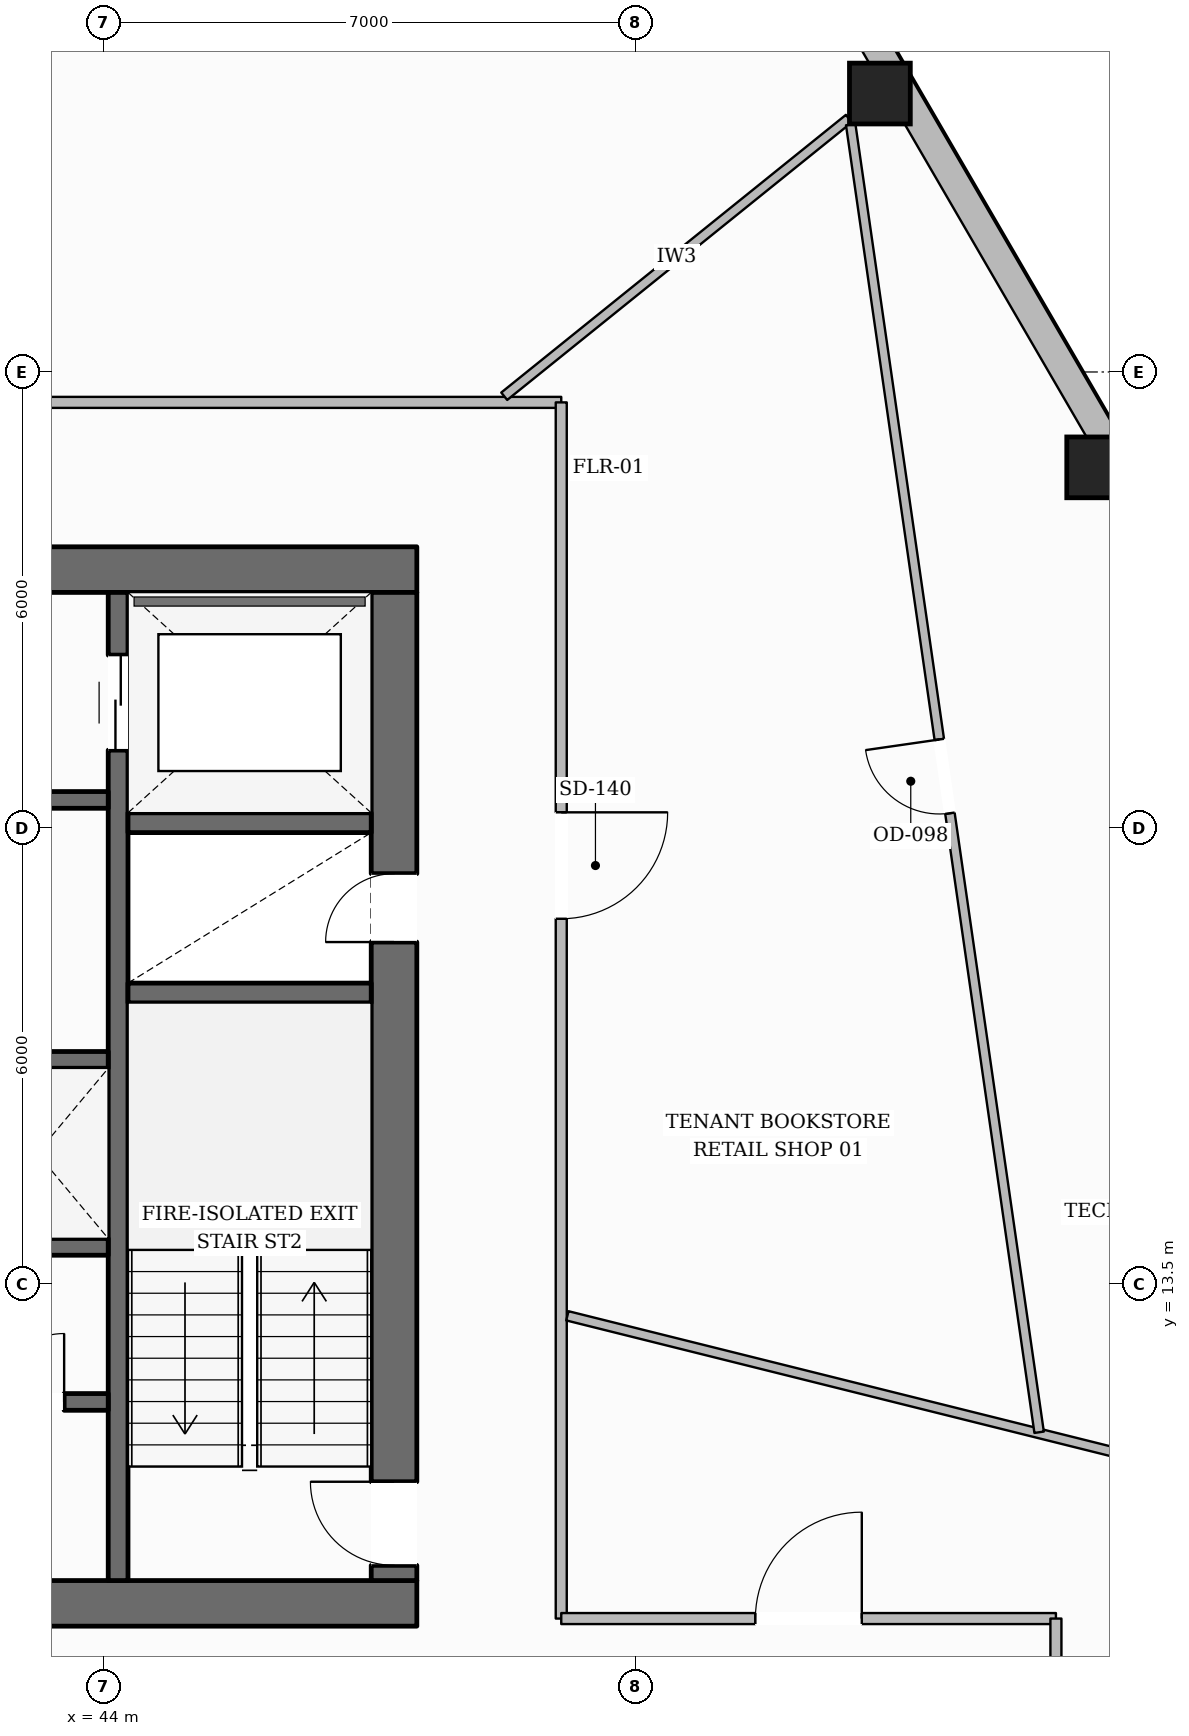
"""IFC4 building model, lengths in metres.
Left out: names, types, materials, properties, quantities, classifications, styles, units other than length and angle.
Written with IfcOpenShell. Run it as: python <this file> out.ifc"""

import sys

from ifc_helpers import new_model, si_unit, direction, frame, frame_2d, origin, origin_2d, place, context, subcontext, project, spatial, rectangle, hollow_rectangle, extrude, element, fill, save


model = new_model("IFC4")
c1 = context("Model", 3, precision=1e-05, world=origin(), true_north=direction((0.0, 1.0)))
c2 = subcontext(c1, "Body", "Model", "MODEL_VIEW")
j1 = project(units=[si_unit("LENGTHUNIT", "METRE"), si_unit("PLANEANGLEUNIT", "RADIAN")], contexts=[c1])
p1 = place(None, origin())
s1 = spatial("IfcSite", under=j1, at=p1, CompositionType="ELEMENT")
p2 = place(p1, origin())
s2 = spatial("IfcBuilding", under=s1, at=p2, CompositionType="ELEMENT")
p3 = place(p2, frame((0.0, 0.0, 44.5)))
s3 = spatial("IfcBuildingStorey", under=s2, at=p3, CompositionType="ELEMENT", Elevation=44.5)
p4 = place(p3, frame((27.88, 9.3, 0.0), z_axis=(0.0, 0.0, 1.0), x_axis=(1.0, 0.0, 0.0)))
e1 = element("IfcWall", 1, at=p4, inside=s3, PredefinedType="SOLIDWALL", context=c2, shape_type="SweptSolid", body=[
    extrude(rectangle(XDim=20.24, YDim=0.6, at=frame_2d((10.12, 0.0))), origin(), (0.0, 0.0, 1.0), 3.59),
])
p5 = place(p4, frame((10.62, 0.0, 0.0)))
e2 = element("IfcOpeningElement", 2, at=p5, cuts=e1, PredefinedType="OPENING", context=c2, shape_type="SweptSolid", body=[
    extrude(rectangle(XDim=1.4, YDim=2.2, at=frame_2d((0.7, 1.1))), frame((0.0, 0.31, 0.0), z_axis=(0.0, -1.0, 0.0), x_axis=(1.0, 0.0, 0.0)), (0.0, 0.0, 1.0), 0.62),
])
p6 = place(p3, frame((27.88, 22.9, 0.0), z_axis=(0.0, 0.0, 1.0), x_axis=(1.0, 0.0, 0.0)))
e3 = element("IfcWall", 3, at=p6, inside=s3, PredefinedType="SOLIDWALL", context=c2, shape_type="SweptSolid", body=[
    extrude(rectangle(XDim=20.24, YDim=0.6, at=frame_2d((10.12, 0.0))), origin(), (0.0, 0.0, 1.0), 3.59),
])
p7 = place(p6, frame((6.395, 0.0, 0.0)))
e4 = element("IfcOpeningElement", 4, at=p7, cuts=e3, PredefinedType="OPENING", context=c2, shape_type="SweptSolid", body=[
    extrude(rectangle(XDim=1.05, YDim=2.15, at=frame_2d((0.525, 1.075))), frame((0.0, 0.31, 0.0), z_axis=(0.0, -1.0, 0.0), x_axis=(1.0, 0.0, 0.0)), (0.0, 0.0, 1.0), 0.62),
])
p8 = place(p6, frame((12.795, 0.0, 0.0)))
e5 = element("IfcOpeningElement", 5, at=p8, cuts=e3, PredefinedType="OPENING", context=c2, shape_type="SweptSolid", body=[
    extrude(rectangle(XDim=1.05, YDim=2.15, at=frame_2d((0.525, 1.075))), frame((0.0, 0.31, 0.0), z_axis=(0.0, -1.0, 0.0), x_axis=(1.0, 0.0, 0.0)), (0.0, 0.0, 1.0), 0.62),
])
p9 = place(p3, frame((47.82, 9.6, 0.0), z_axis=(0.0, 0.0, 1.0), x_axis=(0.0, 1.0, 0.0)))
e6 = element("IfcWall", 6, at=p9, inside=s3, PredefinedType="SOLIDWALL", context=c2, shape_type="SweptSolid", body=[
    extrude(rectangle(XDim=13.0, YDim=0.6, at=frame_2d((6.5, 0.0))), origin(), (0.0, 0.0, 1.0), 3.59),
])
p10 = place(p9, frame((0.2, 0.0, 0.0)))
e7 = element("IfcOpeningElement", 7, at=p10, cuts=e6, PredefinedType="OPENING", context=c2, shape_type="SweptSolid", body=[
    extrude(rectangle(XDim=1.1, YDim=2.15, at=frame_2d((0.55, 1.075))), frame((0.0, 0.31, 0.0), z_axis=(0.0, -1.0, 0.0), x_axis=(1.0, 0.0, 0.0)), (0.0, 0.0, 1.0), 0.62),
])
p11 = place(p9, frame((8.4, 0.0, 0.0)))
e8 = element("IfcOpeningElement", 8, at=p11, cuts=e6, PredefinedType="OPENING", context=c2, shape_type="SweptSolid", body=[
    extrude(rectangle(XDim=0.9, YDim=2.1, at=frame_2d((0.45, 1.05))), frame((0.0, 0.31, 0.0), z_axis=(0.0, -1.0, 0.0), x_axis=(1.0, 0.0, 0.0)), (0.0, 0.0, 1.0), 0.62),
])
p12 = place(p3, frame((44.19, 9.6, 0.0), z_axis=(0.0, 0.0, 1.0), x_axis=(0.0, 1.0, 0.0)))
e9 = element("IfcWall", 9, at=p12, inside=s3, PredefinedType="SHEAR", context=c2, shape_type="SweptSolid", body=[
    extrude(rectangle(XDim=13.0, YDim=0.26, at=frame_2d((6.5, 0.0))), origin(), (0.0, 0.0, 1.0), 3.59),
])
p13 = place(p12, frame((10.925, 0.0, 0.0)))
e10 = element("IfcOpeningElement", 10, at=p13, cuts=e9, PredefinedType="OPENING", context=c2, shape_type="SweptSolid", body=[
    extrude(rectangle(XDim=1.25, YDim=2.25, at=frame_2d((0.625, 1.125))), frame((0.0, 0.14, 0.0), z_axis=(0.0, -1.0, 0.0), x_axis=(1.0, 0.0, 0.0)), (0.0, 0.0, 1.0), 0.28),
])
for number, where, z_axis, x_axis in (
    (11, (44.32, 17.33, 0.0), (0.0, 0.0, 1.0), (1.0, 0.0, 0.0)),
    (12, (44.32, 19.57, 0.0), (0.0, 0.0, 1.0), (1.0, 0.0, 0.0)),
):
    element("IfcWall", number, at=place(p3, frame(where, z_axis=z_axis, x_axis=x_axis)), inside=s3, PredefinedType="SHEAR", context=c2, shape_type="SweptSolid", body=[
        extrude(rectangle(XDim=3.2, YDim=0.26, at=frame_2d((1.6, 0.0))), origin(), (0.0, 0.0, 1.0), 3.59),
    ])
p14 = place(p3, frame((31.94, 19.87, 0.0), z_axis=(0.0, 0.0, 1.0), x_axis=(1.0, 0.0, 0.0)))
e13 = element("IfcWall", 13, at=p14, inside=s3, PredefinedType="SOLIDWALL", context=c2, shape_type="SweptSolid", body=[
    extrude(rectangle(XDim=12.12, YDim=0.22, at=frame_2d((6.06, 0.0))), origin(), (0.0, 0.0, 1.0), 3.59),
])
p15 = place(p14, frame((6.3, 0.0, 0.0)))
e14 = element("IfcOpeningElement", 14, at=p15, cuts=e13, PredefinedType="OPENING", context=c2, shape_type="SweptSolid", body=[
    extrude(rectangle(XDim=1.1, YDim=2.15, at=frame_2d((0.55, 1.075))), frame((0.0, 0.12, 0.0), z_axis=(0.0, -1.0, 0.0), x_axis=(1.0, 0.0, 0.0)), (0.0, 0.0, 1.0), 0.24),
])
p16 = place(p14, frame((8.01, 0.0, 0.0)))
e15 = element("IfcOpeningElement", 15, at=p16, cuts=e13, PredefinedType="OPENING", context=c2, shape_type="SweptSolid", body=[
    extrude(rectangle(XDim=0.9, YDim=2.1, at=frame_2d((0.45, 1.05))), frame((0.0, 0.12, 0.0), z_axis=(0.0, -1.0, 0.0), x_axis=(1.0, 0.0, 0.0)), (0.0, 0.0, 1.0), 0.24),
])
p17 = place(p14, frame((10.21, 0.0, 0.0)))
e16 = element("IfcOpeningElement", 16, at=p17, cuts=e13, PredefinedType="OPENING", context=c2, shape_type="SweptSolid", body=[
    extrude(rectangle(XDim=0.9, YDim=2.1, at=frame_2d((0.45, 1.05))), frame((0.0, 0.12, 0.0), z_axis=(0.0, -1.0, 0.0), x_axis=(1.0, 0.0, 0.0)), (0.0, 0.0, 1.0), 0.24),
])
p18 = place(p3, frame((31.94, 16.45, 0.0), z_axis=(0.0, 0.0, 1.0), x_axis=(1.0, 0.0, 0.0)))
e17 = element("IfcWall", 17, at=p18, inside=s3, PredefinedType="SOLIDWALL", context=c2, shape_type="SweptSolid", body=[
    extrude(rectangle(XDim=12.12, YDim=0.22, at=frame_2d((6.06, 0.0))), origin(), (0.0, 0.0, 1.0), 3.59),
])
p19 = place(p3, frame((31.94, 13.99, 0.0), z_axis=(0.0, 0.0, 1.0), x_axis=(1.0, 0.0, 0.0)))
e18 = element("IfcWall", 18, at=p19, inside=s3, PredefinedType="SOLIDWALL", context=c2, shape_type="SweptSolid", body=[
    extrude(rectangle(XDim=12.12, YDim=0.22, at=frame_2d((6.06, 0.0))), origin(), (0.0, 0.0, 1.0), 3.59),
])
p20 = place(p19, frame((0.385, 0.0, 0.0)))
e19 = element("IfcOpeningElement", 19, at=p20, cuts=e18, PredefinedType="OPENING", context=c2, shape_type="SweptSolid", body=[
    extrude(rectangle(XDim=1.1, YDim=2.2, at=frame_2d((0.55, 1.1))), frame((0.0, 0.12, 0.0), z_axis=(0.0, -1.0, 0.0), x_axis=(1.0, 0.0, 0.0)), (0.0, 0.0, 1.0), 0.24),
])
p21 = place(p19, frame((2.435, 0.0, 0.0)))
e20 = element("IfcOpeningElement", 20, at=p21, cuts=e18, PredefinedType="OPENING", context=c2, shape_type="SweptSolid", body=[
    extrude(rectangle(XDim=1.1, YDim=2.2, at=frame_2d((0.55, 1.1))), frame((0.0, 0.12, 0.0), z_axis=(0.0, -1.0, 0.0), x_axis=(1.0, 0.0, 0.0)), (0.0, 0.0, 1.0), 0.24),
])
p22 = place(p19, frame((4.485, 0.0, 0.0)))
e21 = element("IfcOpeningElement", 21, at=p22, cuts=e18, PredefinedType="OPENING", context=c2, shape_type="SweptSolid", body=[
    extrude(rectangle(XDim=1.1, YDim=2.2, at=frame_2d((0.55, 1.1))), frame((0.0, 0.12, 0.0), z_axis=(0.0, -1.0, 0.0), x_axis=(1.0, 0.0, 0.0)), (0.0, 0.0, 1.0), 0.24),
])
p23 = place(p3, frame((40.28, 11.95, 0.0), z_axis=(0.0, 0.0, 1.0), x_axis=(1.0, 0.0, 0.0)))
e22 = element("IfcWall", 22, at=p23, inside=s3, PredefinedType="SOLIDWALL", context=c2, shape_type="SweptSolid", body=[
    extrude(rectangle(XDim=3.78, YDim=0.22, at=frame_2d((1.89, 0.0))), origin(), (0.0, 0.0, 1.0), 3.59),
])
p24 = place(p23, frame((0.47, 0.0, 0.0)))
e23 = element("IfcOpeningElement", 23, at=p24, cuts=e22, PredefinedType="OPENING", context=c2, shape_type="SweptSolid", body=[
    extrude(rectangle(XDim=0.9, YDim=2.1, at=frame_2d((0.45, 1.05))), frame((0.0, 0.12, 0.0), z_axis=(0.0, -1.0, 0.0), x_axis=(1.0, 0.0, 0.0)), (0.0, 0.0, 1.0), 0.24),
])
p25 = place(p23, frame((2.3, 0.0, 0.0)))
e24 = element("IfcOpeningElement", 24, at=p25, cuts=e22, PredefinedType="OPENING", context=c2, shape_type="SweptSolid", body=[
    extrude(rectangle(XDim=0.9, YDim=2.1, at=frame_2d((0.45, 1.05))), frame((0.0, 0.12, 0.0), z_axis=(0.0, -1.0, 0.0), x_axis=(1.0, 0.0, 0.0)), (0.0, 0.0, 1.0), 0.24),
])
for number, where, z_axis, x_axis in (
    (25, (57.071, 24.245, 0.0), (0.0, 0.0, 1.0), (1.0, 0.0, 0.0)),
    (26, (54.212, 29.163, 0.0), (0.0, 0.0, 1.0), (1.0, 0.0, 0.0)),
):
    element("IfcColumn", number, at=place(p3, frame(where, z_axis=z_axis, x_axis=x_axis)), inside=s3, PredefinedType="COLUMN", context=c2, shape_type="SweptSolid", body=[
        extrude(hollow_rectangle(XDim=0.8, YDim=0.8, WallThickness=0.036, at=origin_2d()), origin(), (0.0, 0.0, 1.0), 3.59),
    ])
p26 = place(p3, frame((63.26, 14.69, 0.0), z_axis=(0.0, 0.0, 1.0), x_axis=(-0.497393616325, -0.867524979721, 0.0)))
e27 = element("IfcWall", 27, at=p26, inside=s3, PredefinedType="STANDARD", context=c2, shape_type="SweptSolid", body=[
    extrude(rectangle(XDim=15.982, YDim=0.3, at=frame_2d((7.991, 0.0))), origin(), (0.0, 0.0, 1.0), 2.97),
])
p27 = place(p26, frame((7.391, 0.0, 0.65)))
e28 = element("IfcOpeningElement", 28, at=p27, cuts=e27, PredefinedType="OPENING", context=c2, shape_type="SweptSolid", body=[
    extrude(rectangle(XDim=1.2, YDim=1.7, at=frame_2d((0.6, 0.85))), frame((0.0, 0.16, 0.0), z_axis=(0.0, -1.0, 0.0), x_axis=(1.0, 0.0, 0.0)), (0.0, 0.0, 1.0), 0.32),
])
p28 = place(p3, frame((45.631, 44.462, 0.0), z_axis=(0.0, 0.0, 1.0), x_axis=(0.502579693438, -0.864530885362, 0.0)))
e29 = element("IfcWall", 29, at=p28, inside=s3, PredefinedType="STANDARD", context=c2, shape_type="SweptSolid", body=[
    extrude(rectangle(XDim=35.081, YDim=0.38, at=frame_2d((17.541, 0.0))), origin(), (0.0, 0.0, 1.0), 2.97),
])
p29 = place(p28, frame((30.935, 0.0, 0.65)))
e30 = element("IfcOpeningElement", 30, at=p29, cuts=e29, PredefinedType="OPENING", context=c2, shape_type="SweptSolid", body=[
    extrude(rectangle(XDim=1.65, YDim=1.75, at=frame_2d((0.825, 0.875))), frame((0.0, 0.2, 0.0), z_axis=(0.0, -1.0, 0.0), x_axis=(1.0, 0.0, 0.0)), (0.0, 0.0, 1.0), 0.4),
])
p30 = place(p28, frame((25.246, 0.0, 0.65)))
e31 = element("IfcOpeningElement", 31, at=p30, cuts=e29, PredefinedType="OPENING", context=c2, shape_type="SweptSolid", body=[
    extrude(rectangle(XDim=1.65, YDim=1.75, at=frame_2d((0.825, 0.875))), frame((0.0, 0.2, 0.0), z_axis=(0.0, -1.0, 0.0), x_axis=(1.0, 0.0, 0.0)), (0.0, 0.0, 1.0), 0.4),
])
p31 = place(p28, frame((13.87, 0.0, 0.65)))
e32 = element("IfcOpeningElement", 32, at=p31, cuts=e29, PredefinedType="OPENING", context=c2, shape_type="SweptSolid", body=[
    extrude(rectangle(XDim=1.65, YDim=1.75, at=frame_2d((0.825, 0.875))), frame((0.0, 0.2, 0.0), z_axis=(0.0, -1.0, 0.0), x_axis=(1.0, 0.0, 0.0)), (0.0, 0.0, 1.0), 0.4),
])
p32 = place(p28, frame((8.182, 0.0, 0.65)))
e33 = element("IfcOpeningElement", 33, at=p32, cuts=e29, PredefinedType="OPENING", context=c2, shape_type="SweptSolid", body=[
    extrude(rectangle(XDim=1.65, YDim=1.75, at=frame_2d((0.825, 0.875))), frame((0.0, 0.2, 0.0), z_axis=(0.0, -1.0, 0.0), x_axis=(1.0, 0.0, 0.0)), (0.0, 0.0, 1.0), 0.4),
])
p33 = place(p28, frame((2.493, 0.0, 0.65)))
e34 = element("IfcOpeningElement", 34, at=p33, cuts=e29, PredefinedType="OPENING", context=c2, shape_type="SweptSolid", body=[
    extrude(rectangle(XDim=1.65, YDim=1.75, at=frame_2d((0.825, 0.875))), frame((0.0, 0.2, 0.0), z_axis=(0.0, -1.0, 0.0), x_axis=(1.0, 0.0, 0.0)), (0.0, 0.0, 1.0), 0.4),
])
p34 = place(p3, frame((39.0, 25.1, 0.0), z_axis=(0.0, 0.0, 1.0), x_axis=(1.0, 0.0, 0.0)))
e35 = element("IfcWall", 35, at=p34, inside=s3, PredefinedType="PARTITIONING", context=c2, shape_type="SweptSolid", body=[
    extrude(rectangle(XDim=11.02, YDim=0.145, at=frame_2d((5.51, 0.0))), origin(), (0.0, 0.0, 1.0), 3.59),
])
p35 = place(p3, frame((50.02, 25.1, 0.0), z_axis=(0.0, 0.0, 1.0), x_axis=(0.0, -1.0, 0.0)))
e36 = element("IfcWall", 36, at=p35, inside=s3, PredefinedType="PARTITIONING", context=c2, shape_type="SweptSolid", body=[
    extrude(rectangle(XDim=16.0, YDim=0.145, at=frame_2d((8.0, 0.0))), origin(), (0.0, 0.0, 1.0), 3.278),
])
p36 = place(p35, frame((5.393, 0.0, 0.0)))
e37 = element("IfcOpeningElement", 37, at=p36, cuts=e36, PredefinedType="OPENING", context=c2, shape_type="SweptSolid", body=[
    extrude(rectangle(XDim=1.4, YDim=2.2, at=frame_2d((0.7, 1.1))), frame((0.0, 0.083, 0.0), z_axis=(0.0, -1.0, 0.0), x_axis=(1.0, 0.0, 0.0)), (0.0, 0.0, 1.0), 0.165),
])
p37 = place(p3, frame((50.02, 9.1, 0.0), z_axis=(0.0, 0.0, 1.0), x_axis=(1.0, 0.0, 0.0)))
e38 = element("IfcWall", 38, at=p37, inside=s3, PredefinedType="PARTITIONING", context=c2, shape_type="SweptSolid", body=[
    extrude(rectangle(XDim=6.508, YDim=0.145, at=frame_2d((3.254, 0.0))), origin(), (0.0, 0.0, 1.0), 3.59),
])
p38 = place(p37, frame((2.554, 0.0, 0.0)))
e39 = element("IfcOpeningElement", 39, at=p38, cuts=e38, PredefinedType="OPENING", context=c2, shape_type="SweptSolid", body=[
    extrude(rectangle(XDim=1.4, YDim=2.2, at=frame_2d((0.7, 1.1))), frame((0.0, 0.083, 0.0), z_axis=(0.0, -1.0, 0.0), x_axis=(1.0, 0.0, 0.0)), (0.0, 0.0, 1.0), 0.165),
])
p39 = place(p3, frame((56.528, 9.1, 0.0), z_axis=(0.0, 0.0, 1.0), x_axis=(0.0, -1.0, 0.0)))
e40 = element("IfcWall", 40, at=p39, inside=s3, PredefinedType="PARTITIONING", context=c2, shape_type="SweptSolid", body=[
    extrude(rectangle(XDim=2.0, YDim=0.145, at=frame_2d((1.0, 0.0))), origin(), (0.0, 0.0, 1.0), 3.59),
])
p40 = place(p3, frame((49.27, 25.18, 0.0), z_axis=(0.0, 0.0, 1.0), x_axis=(0.778683923626, 0.627416406453, 0.0)))
e41 = element("IfcWall", 41, at=p40, inside=s3, PredefinedType="PARTITIONING", context=c2, shape_type="SweptSolid", body=[
    extrude(rectangle(XDim=5.823, YDim=0.125, at=frame_2d((2.912, 0.0))), origin(), (0.0, 0.0, 1.0), 3.057),
])
p41 = place(p3, frame((50.101, 13.083, 0.0), z_axis=(0.0, 0.0, 1.0), x_axis=(0.970294476974, -0.241926906221, 0.0)))
e42 = element("IfcWall", 42, at=p41, inside=s3, PredefinedType="PARTITIONING", context=c2, shape_type="SweptSolid", body=[
    extrude(rectangle(XDim=10.854, YDim=0.125, at=frame_2d((5.427, 0.0))), origin(), (0.0, 0.0, 1.0), 3.59),
])
p42 = place(p3, frame((56.307, 11.551, 0.0), z_axis=(0.0, 0.0, 1.0), x_axis=(-0.142608983758, 0.989779105534, 0.0)))
e43 = element("IfcWall", 43, at=p42, inside=s3, PredefinedType="PARTITIONING", context=c2, shape_type="SweptSolid", body=[
    extrude(rectangle(XDim=17.382, YDim=0.125, at=frame_2d((8.691, 0.0))), origin(), (0.0, 0.0, 1.0), 3.278),
])
p43 = place(p42, frame((8.228, 0.0, 0.0)))
e44 = element("IfcOpeningElement", 44, at=p43, cuts=e43, PredefinedType="OPENING", context=c2, shape_type="SweptSolid", body=[
    extrude(rectangle(XDim=0.98, YDim=2.15, at=frame_2d((0.49, 1.075))), frame((0.0, 0.073, 0.0), z_axis=(0.0, -1.0, 0.0), x_axis=(1.0, 0.0, 0.0)), (0.0, 0.0, 1.0), 0.145),
])
p44 = place(p10, origin())
e45 = element("IfcDoor", 45, at=p44, inside=s3, OperationType="SINGLE_SWING_RIGHT", PredefinedType="DOOR", context=c2, shape_type="SweptSolid", body=[
    extrude(rectangle(XDim=1.1, YDim=2.15, at=frame_2d((0.55, 1.075))), frame((0.0, 0.025, 0.0), z_axis=(0.0, -1.0, 0.0), x_axis=(1.0, 0.0, 0.0)), (0.0, 0.0, 1.0), 0.05),
])
fill(e7, e45)
p45 = place(p11, origin())
e46 = element("IfcDoor", 46, at=p45, inside=s3, OperationType="SINGLE_SWING_LEFT", PredefinedType="DOOR", context=c2, shape_type="SweptSolid", body=[
    extrude(rectangle(XDim=0.9, YDim=2.1, at=frame_2d((0.45, 1.05))), frame((0.0, 0.025, 0.0), z_axis=(0.0, -1.0, 0.0), x_axis=(1.0, 0.0, 0.0)), (0.0, 0.0, 1.0), 0.05),
])
fill(e8, e46)
p46 = place(p13, origin())
e47 = element("IfcDoor", 47, at=p46, inside=s3, OperationType="DOUBLE_DOOR_SLIDING", PredefinedType="DOOR", context=c2, shape_type="SweptSolid", body=[
    extrude(rectangle(XDim=1.25, YDim=2.25, at=frame_2d((0.625, 1.125))), frame((0.0, 0.025, 0.0), z_axis=(0.0, -1.0, 0.0), x_axis=(1.0, 0.0, 0.0)), (0.0, 0.0, 1.0), 0.05),
])
fill(e10, e47)
p47 = place(p25, origin())
e48 = element("IfcDoor", 48, at=p47, inside=s3, OperationType="SINGLE_SWING_RIGHT", PredefinedType="DOOR", context=c2, shape_type="SweptSolid", body=[
    extrude(rectangle(XDim=0.9, YDim=2.1, at=frame_2d((0.45, 1.05))), frame((0.0, 0.025, 0.0), z_axis=(0.0, -1.0, 0.0), x_axis=(1.0, 0.0, 0.0)), (0.0, 0.0, 1.0), 0.05),
])
fill(e24, e48)
p48 = place(p36, origin())
e49 = element("IfcDoor", 49, at=p48, inside=s3, OperationType="SINGLE_SWING_LEFT", PredefinedType="DOOR", context=c2, shape_type="SweptSolid", body=[
    extrude(rectangle(XDim=1.4, YDim=2.2, at=frame_2d((0.7, 1.1))), frame((0.0, 0.025, 0.0), z_axis=(0.0, -1.0, 0.0), x_axis=(1.0, 0.0, 0.0)), (0.0, 0.0, 1.0), 0.05),
])
fill(e37, e49)
p49 = place(p43, origin())
e50 = element("IfcDoor", 50, at=p49, inside=s3, OperationType="SINGLE_SWING_RIGHT", PredefinedType="DOOR", context=c2, shape_type="SweptSolid", body=[
    extrude(rectangle(XDim=0.98, YDim=2.15, at=frame_2d((0.49, 1.075))), frame((0.0, 0.025, 0.0), z_axis=(0.0, -1.0, 0.0), x_axis=(1.0, 0.0, 0.0)), (0.0, 0.0, 1.0), 0.05),
])
fill(e44, e50)
p50 = place(p38, origin())
e51 = element("IfcDoor", 51, at=p50, inside=s3, OperationType="SINGLE_SWING_RIGHT", PredefinedType="DOOR", context=c2, shape_type="SweptSolid", body=[
    extrude(rectangle(XDim=1.4, YDim=2.2, at=frame_2d((0.7, 1.1))), frame((0.0, 0.025, 0.0), z_axis=(0.0, -1.0, 0.0), x_axis=(1.0, 0.0, 0.0)), (0.0, 0.0, 1.0), 0.05),
])
fill(e39, e51)
save(model, sys.argv[1])
